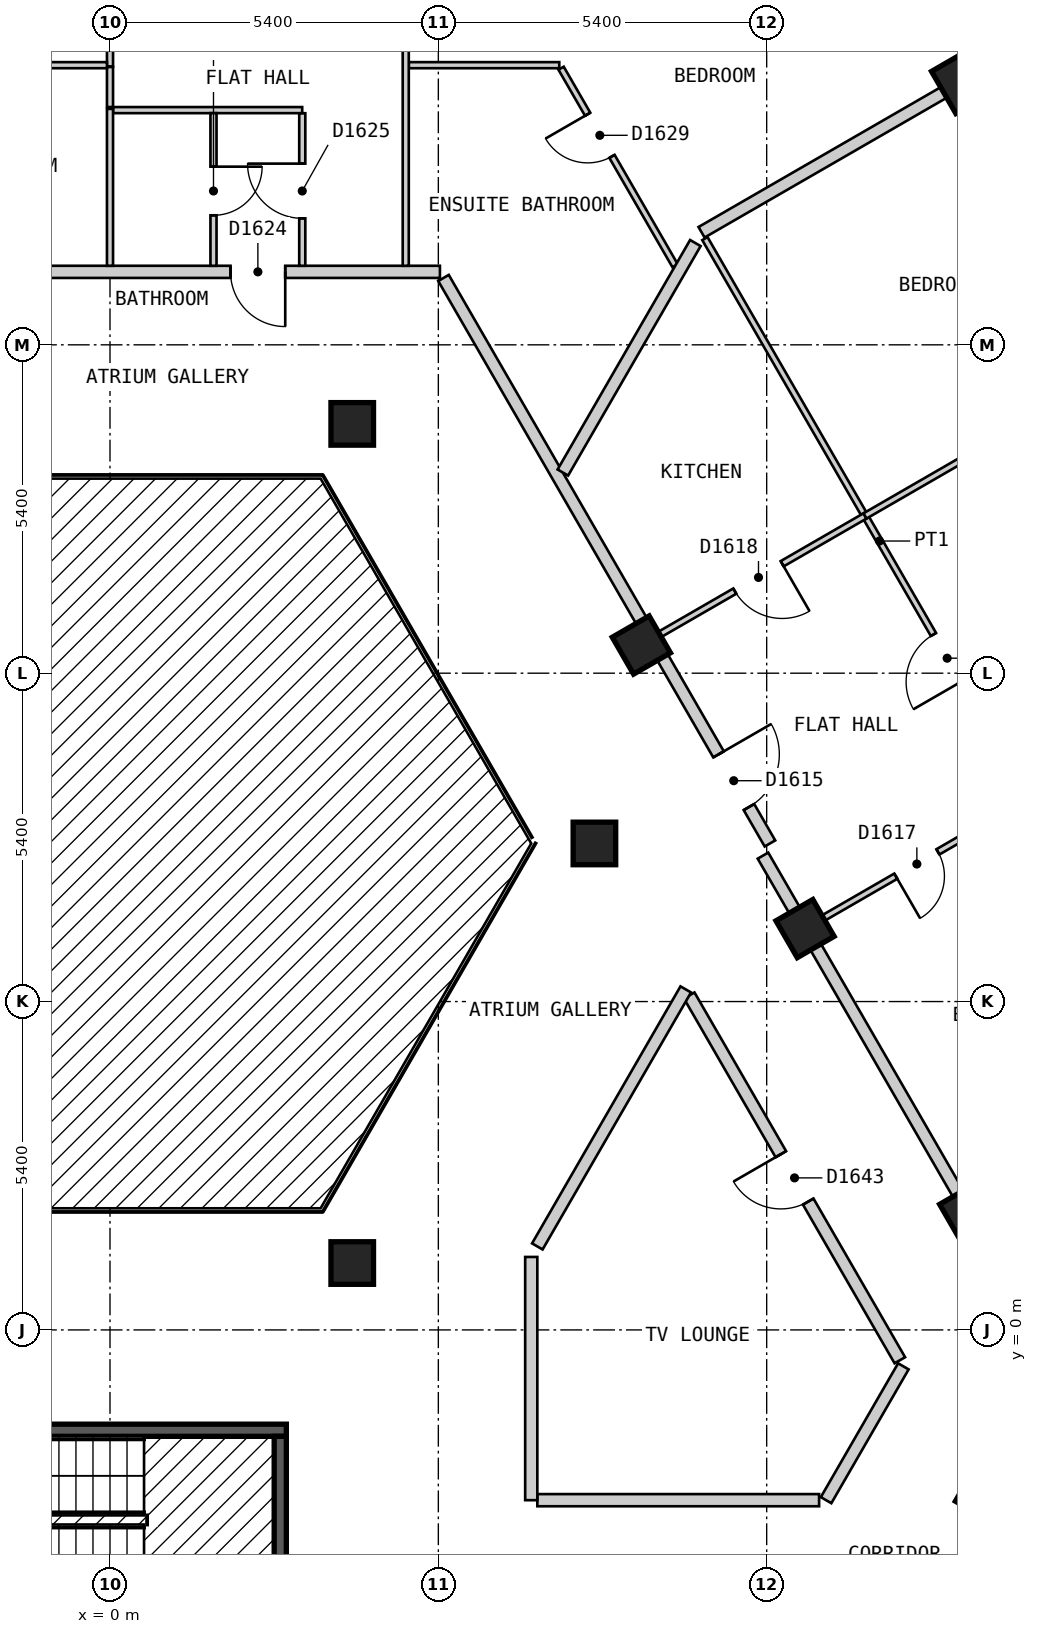
"""IFC4 building model, lengths in metres.
Left out: names, types, materials, properties, quantities, classifications, styles, units other than length and angle.
Written with IfcOpenShell. Run it as: python <this file> out.ifc"""

import sys

from ifc_helpers import new_model, si_unit, direction, frame, frame_2d, origin, origin_2d, place, context, subcontext, project, spatial, rectangle, extrude, element, fill, save


model = new_model("IFC4")
c1 = context("Model", 3, precision=1e-05, world=origin(), true_north=direction((0.0, 1.0)))
c2 = subcontext(c1, "Body", "Model", "MODEL_VIEW")
j1 = project(units=[si_unit("LENGTHUNIT", "METRE"), si_unit("PLANEANGLEUNIT", "RADIAN")], contexts=[c1])
p1 = place(None, origin())
s1 = spatial("IfcSite", under=j1, at=p1, CompositionType="ELEMENT")
p2 = place(p1, origin())
s2 = spatial("IfcBuilding", under=s1, at=p2, CompositionType="ELEMENT")
p3 = place(p2, frame((0.0, 0.0, 163.2)))
s3 = spatial("IfcBuildingStorey", under=s2, at=p3, CompositionType="ELEMENT", Elevation=163.2)
p4 = place(p3, frame((14.058, 20.55, 0.0), z_axis=(0.0, 0.0, 1.0), x_axis=(-0.5, 0.866025403784, 0.0)))
e1 = element("IfcColumn", 1, at=p4, inside=s3, PredefinedType="COLUMN", context=c2, shape_type="SweptSolid", body=[
    extrude(rectangle(XDim=0.8, YDim=0.8, at=origin_2d()), origin(), (0.0, 0.0, 1.0), 3.0),
])
for number, where, z_axis, x_axis in (
    (2, (14.382, -2.689, 0.0), (0.0, 0.0, 1.0), (0.5, 0.866, 0.0)),
    (3, (14.123, 1.937, 0.0), (0.0, 0.0, 1.0), (-0.5, 0.866, 0.0)),
    (4, (3.984, 1.1, 0.0), (0.0, 0.0, 1.0), (1.0, 0.0, 0.0)),
    (5, (11.431, 6.6, 0.0), (0.0, 0.0, 1.0), (-0.5, 0.866, 0.0)),
    (6, (7.967, 8.0, 0.0), (0.0, 0.0, 1.0), (1.0, 0.0, 0.0)),
    (7, (8.739, 11.263, 0.0), (0.0, 0.0, 1.0), (-0.5, 0.866, 0.0)),
    (8, (3.984, 14.9, 0.0), (0.0, 0.0, 1.0), (1.0, 0.0, 0.0)),
):
    element("IfcColumn", number, at=place(p3, frame(where, z_axis=z_axis, x_axis=x_axis)), inside=s3, PredefinedType="COLUMN", context=c2, shape_type="SweptSolid", body=[
        extrude(rectangle(XDim=0.7, YDim=0.7, at=origin_2d()), origin(), (0.0, 0.0, 1.0), 3.0),
    ])
p5 = place(p3, frame((-2.9, -1.65, 0.0), z_axis=(0.0, 0.0, 1.0), x_axis=(1.0, 0.0, 0.0)))
e9 = element("IfcWall", 9, at=p5, inside=s3, PredefinedType="SOLIDWALL", context=c2, shape_type="SweptSolid", body=[
    extrude(rectangle(XDim=5.8, YDim=0.2, at=frame_2d((2.9, 0.0))), origin(), (0.0, 0.0, 1.0), 2.7),
])
p6 = place(p5, frame((0.3, 0.0, 0.0)))
e10 = element("IfcOpeningElement", 10, at=p6, cuts=e9, PredefinedType="OPENING", context=c2, shape_type="SweptSolid", body=[
    extrude(rectangle(XDim=1.2, YDim=2.1, at=frame_2d((0.6, 1.05))), frame((0.0, 0.11, 0.0), z_axis=(0.0, -1.0, 0.0), x_axis=(1.0, 0.0, 0.0)), (0.0, 0.0, 1.0), 0.22),
])
p7 = place(p3, frame((2.8, -4.5, 0.0), z_axis=(0.0, 0.0, 1.0), x_axis=(0.0, 1.0, 0.0)))
e11 = element("IfcWall", 11, at=p7, inside=s3, PredefinedType="SOLIDWALL", context=c2, shape_type="SweptSolid", body=[
    extrude(rectangle(XDim=2.75, YDim=0.2, at=frame_2d((1.375, 0.0))), origin(), (0.0, 0.0, 1.0), 2.7),
])
p8 = place(p3, frame((9.526, 5.5, 0.0), z_axis=(0.0, 0.0, 1.0), x_axis=(0.500062092869, -0.865989551482, 0.0)))
e12 = element("IfcWall", 12, at=p8, inside=s3, PredefinedType="PARTITIONING", context=c2, shape_type="SweptSolid", body=[
    extrude(rectangle(XDim=6.927, YDim=0.2, at=frame_2d((3.464, 0.0))), origin(), (0.0, 0.0, 1.0), 2.7),
])
p9 = place(p8, frame((3.014, 0.0, 0.0)))
e13 = element("IfcOpeningElement", 13, at=p9, cuts=e12, PredefinedType="OPENING", context=c2, shape_type="SweptSolid", body=[
    extrude(rectangle(XDim=0.9, YDim=2.1, at=frame_2d((0.45, 1.05))), frame((0.0, 0.11, 0.0), z_axis=(0.0, -1.0, 0.0), x_axis=(1.0, 0.0, 0.0)), (0.0, 0.0, 1.0), 0.22),
])
p10 = place(p3, frame((10.739, 7.8, 0.0), z_axis=(0.0, 0.0, 1.0), x_axis=(0.499964311759, -0.86604600742, 0.0)))
e14 = element("IfcWall", 14, at=p10, inside=s3, PredefinedType="PARTITIONING", context=c2, shape_type="SweptSolid", body=[
    extrude(rectangle(XDim=9.583, YDim=0.2, at=frame_2d((4.792, 0.0))), origin(), (0.0, 0.0, 1.0), 2.7),
])
p11 = place(p3, frame((5.485, 17.3, 0.0), z_axis=(0.0, 0.0, 1.0), x_axis=(0.499965832213, -0.866045129667, 0.0)))
e15 = element("IfcWall", 15, at=p11, inside=s3, PredefinedType="PARTITIONING", context=c2, shape_type="SweptSolid", body=[
    extrude(rectangle(XDim=10.739, YDim=0.2, at=frame_2d((5.369, 0.0))), origin(), (0.0, 0.0, 1.0), 2.7),
])
p12 = place(p11, frame((9.047, 0.0, 0.0)))
e16 = element("IfcOpeningElement", 16, at=p12, cuts=e15, PredefinedType="OPENING", context=c2, shape_type="SweptSolid", body=[
    extrude(rectangle(XDim=1.0, YDim=2.1, at=frame_2d((0.5, 1.05))), frame((0.0, 0.11, 0.0), z_axis=(0.0, -1.0, 0.0), x_axis=(1.0, 0.0, 0.0)), (0.0, 0.0, 1.0), 0.22),
])
p13 = place(p3, frame((7.028, -2.8, 0.0), z_axis=(0.0, 0.0, 1.0), x_axis=(1.0, 0.0, 0.0)))
e17 = element("IfcWall", 17, at=p13, inside=s3, PredefinedType="PARTITIONING", context=c2, shape_type="SweptSolid", body=[
    extrude(rectangle(XDim=4.634, YDim=0.2, at=frame_2d((2.317, 0.0))), origin(), (0.0, 0.0, 1.0), 2.7),
])
p14 = place(p3, frame((-5.312, 17.4, 0.0), z_axis=(0.0, 0.0, 1.0), x_axis=(1.0, 0.0, 0.0)))
e18 = element("IfcWall", 18, at=p14, inside=s3, PredefinedType="PARTITIONING", context=c2, shape_type="SweptSolid", body=[
    extrude(rectangle(XDim=10.738, YDim=0.2, at=frame_2d((5.369, 0.0))), origin(), (0.0, 0.0, 1.0), 2.7),
])
p15 = place(p14, frame((7.294, 0.0, 0.0)))
e19 = element("IfcOpeningElement", 19, at=p15, cuts=e18, PredefinedType="OPENING", context=c2, shape_type="SweptSolid", body=[
    extrude(rectangle(XDim=0.9, YDim=2.1, at=frame_2d((0.45, 1.05))), frame((0.0, 0.11, 0.0), z_axis=(0.0, -1.0, 0.0), x_axis=(1.0, 0.0, 0.0)), (0.0, 0.0, 1.0), 0.22),
])
p16 = place(p3, frame((7.028, 1.373, 0.0), z_axis=(0.0, 0.0, 1.0), x_axis=(0.500065924398, 0.86598733897, 0.0)))
e20 = element("IfcWall", 20, at=p16, inside=s3, PredefinedType="PARTITIONING", context=c2, shape_type="SweptSolid", body=[
    extrude(rectangle(XDim=4.881, YDim=0.2, at=frame_2d((2.44, 0.0))), origin(), (0.0, 0.0, 1.0), 2.7),
])
p17 = place(p3, frame((11.777, -2.8, 0.0), z_axis=(0.0, 0.0, 1.0), x_axis=(0.500085537782, 0.86597601289, 0.0)))
e21 = element("IfcWall", 21, at=p17, inside=s3, PredefinedType="PARTITIONING", context=c2, shape_type="SweptSolid", body=[
    extrude(rectangle(XDim=2.542, YDim=0.2, at=frame_2d((1.271, 0.0))), origin(), (0.0, 0.0, 1.0), 2.7),
])
p18 = place(p3, frame((6.928, -2.8, 0.0), z_axis=(0.0, 0.0, 1.0), x_axis=(0.0, 1.0, 0.0)))
e22 = element("IfcWall", 22, at=p18, inside=s3, PredefinedType="PARTITIONING", context=c2, shape_type="SweptSolid", body=[
    extrude(rectangle(XDim=4.0, YDim=0.2, at=frame_2d((2.0, 0.0))), origin(), (0.0, 0.0, 1.0), 2.7),
])
p19 = place(p3, frame((7.419, 20.749, 0.0), z_axis=(0.0, 0.0, 1.0), x_axis=(0.499917691695, -0.866072919292, 0.0)))
e23 = element("IfcWall", 23, at=p19, inside=s3, PredefinedType="PARTITIONING", context=c2, shape_type="SweptSolid", body=[
    extrude(rectangle(XDim=3.753, YDim=0.1, at=frame_2d((1.876, 0.0))), origin(), (0.0, 0.0, 1.0), 2.7),
])
p20 = place(p19, frame((0.874, 0.0, 0.0)))
e24 = element("IfcOpeningElement", 24, at=p20, cuts=e23, PredefinedType="OPENING", context=c2, shape_type="SweptSolid", body=[
    extrude(rectangle(XDim=0.8, YDim=2.1, at=frame_2d((0.4, 1.05))), frame((0.0, 0.06, 0.0), z_axis=(0.0, -1.0, 0.0), x_axis=(1.0, 0.0, 0.0)), (0.0, 0.0, 1.0), 0.12),
])
p21 = place(p3, frame((9.784, 17.947, 0.0), z_axis=(0.0, 0.0, 1.0), x_axis=(0.500016228266, -0.866016034188, 0.0)))
e25 = element("IfcWall", 25, at=p21, inside=s3, PredefinedType="PARTITIONING", context=c2, shape_type="SweptSolid", body=[
    extrude(rectangle(XDim=11.486, YDim=0.1, at=frame_2d((5.743, 0.0))), origin(), (0.0, 0.0, 1.0), 2.7),
])
p22 = place(p21, frame((7.518, 0.0, 0.0)))
e26 = element("IfcOpeningElement", 26, at=p22, cuts=e25, PredefinedType="OPENING", context=c2, shape_type="SweptSolid", body=[
    extrude(rectangle(XDim=0.9, YDim=2.1, at=frame_2d((0.45, 1.05))), frame((0.0, 0.06, 0.0), z_axis=(0.0, -1.0, 0.0), x_axis=(1.0, 0.0, 0.0)), (0.0, 0.0, 1.0), 0.12),
])
p23 = place(p3, frame((0.0, 20.769, 0.0), z_axis=(0.0, 0.0, 1.0), x_axis=(0.0, -1.0, 0.0)))
e27 = element("IfcWall", 27, at=p23, inside=s3, PredefinedType="PARTITIONING", context=c2, shape_type="SweptSolid", body=[
    extrude(rectangle(XDim=0.659, YDim=0.1, at=frame_2d((0.33, 0.0))), origin(), (0.0, 0.0, 1.0), 2.7),
])
p24 = place(p3, frame((3.162, 20.009, 0.0), z_axis=(0.0, 0.0, 1.0), x_axis=(0.0, -1.0, 0.0)))
e28 = element("IfcWall", 28, at=p24, inside=s3, PredefinedType="PARTITIONING", context=c2, shape_type="SweptSolid", body=[
    extrude(rectangle(XDim=2.509, YDim=0.1, at=frame_2d((1.254, 0.0))), origin(), (0.0, 0.0, 1.0), 2.7),
])
p25 = place(p24, frame((0.829, 0.0, 0.0)))
e29 = element("IfcOpeningElement", 29, at=p25, cuts=e28, PredefinedType="OPENING", context=c2, shape_type="SweptSolid", body=[
    extrude(rectangle(XDim=0.9, YDim=2.1, at=frame_2d((0.45, 1.05))), frame((0.0, 0.06, 0.0), z_axis=(0.0, -1.0, 0.0), x_axis=(1.0, 0.0, 0.0)), (0.0, 0.0, 1.0), 0.12),
])
p26 = place(p3, frame((0.05, 20.06, 0.0), z_axis=(0.0, 0.0, 1.0), x_axis=(1.0, 0.0, 0.0)))
e30 = element("IfcWall", 30, at=p26, inside=s3, PredefinedType="PARTITIONING", context=c2, shape_type="SweptSolid", body=[
    extrude(rectangle(XDim=3.111, YDim=0.1, at=frame_2d((1.555, 0.0))), origin(), (0.0, 0.0, 1.0), 2.7),
])
p27 = place(p3, frame((4.914, 20.799, 0.0), z_axis=(0.0, 0.0, 1.0), x_axis=(1.0, 0.0, 0.0)))
e31 = element("IfcWall", 31, at=p27, inside=s3, PredefinedType="PARTITIONING", context=c2, shape_type="SweptSolid", body=[
    extrude(rectangle(XDim=2.475, YDim=0.1, at=frame_2d((1.237, 0.0))), origin(), (0.0, 0.0, 1.0), 2.7),
])
p28 = place(p3, frame((4.864, 17.5, 0.0), z_axis=(0.0, 0.0, 1.0), x_axis=(0.0, 1.0, 0.0)))
e32 = element("IfcWall", 32, at=p28, inside=s3, PredefinedType="PARTITIONING", context=c2, shape_type="SweptSolid", body=[
    extrude(rectangle(XDim=6.4, YDim=0.1, at=frame_2d((3.2, 0.0))), origin(), (0.0, 0.0, 1.0), 2.7),
])
p29 = place(p28, frame((4.2, 0.0, 0.0)))
e33 = element("IfcOpeningElement", 33, at=p29, cuts=e32, PredefinedType="OPENING", context=c2, shape_type="SweptSolid", body=[
    extrude(rectangle(XDim=0.9, YDim=2.1, at=frame_2d((0.45, 1.05))), frame((0.0, 0.06, 0.0), z_axis=(0.0, -1.0, 0.0), x_axis=(1.0, 0.0, 0.0)), (0.0, 0.0, 1.0), 0.12),
])
p30 = place(p3, frame((1.702, 17.5, 0.0), z_axis=(0.0, 0.0, 1.0), x_axis=(0.0, 1.0, 0.0)))
e34 = element("IfcWall", 34, at=p30, inside=s3, PredefinedType="PARTITIONING", context=c2, shape_type="SweptSolid", body=[
    extrude(rectangle(XDim=2.51, YDim=0.1, at=frame_2d((1.255, 0.0))), origin(), (0.0, 0.0, 1.0), 2.7),
])
p31 = place(p30, frame((0.83, 0.0, 0.0)))
e35 = element("IfcOpeningElement", 35, at=p31, cuts=e34, PredefinedType="OPENING", context=c2, shape_type="SweptSolid", body=[
    extrude(rectangle(XDim=0.8, YDim=2.1, at=frame_2d((0.4, 1.05))), frame((0.0, 0.06, 0.0), z_axis=(0.0, -1.0, 0.0), x_axis=(1.0, 0.0, 0.0)), (0.0, 0.0, 1.0), 0.12),
])
p32 = place(p3, frame((0.0, 17.5, 0.0), z_axis=(0.0, 0.0, 1.0), x_axis=(0.0, 1.0, 0.0)))
e36 = element("IfcWall", 36, at=p32, inside=s3, PredefinedType="PARTITIONING", context=c2, shape_type="SweptSolid", body=[
    extrude(rectangle(XDim=2.58, YDim=0.1, at=frame_2d((1.29, 0.0))), origin(), (0.0, 0.0, 1.0), 2.7),
])
p33 = place(p3, frame((0.0, 20.779, 0.0), z_axis=(0.0, 0.0, 1.0), x_axis=(0.0, 1.0, 0.0)))
e37 = element("IfcWall", 37, at=p33, inside=s3, PredefinedType="PARTITIONING", context=c2, shape_type="SweptSolid", body=[
    extrude(rectangle(XDim=3.121, YDim=0.1, at=frame_2d((1.561, 0.0))), origin(), (0.0, 0.0, 1.0), 2.7),
])
p34 = place(p33, frame((0.91, 0.0, 0.0)))
e38 = element("IfcOpeningElement", 38, at=p34, cuts=e37, PredefinedType="OPENING", context=c2, shape_type="SweptSolid", body=[
    extrude(rectangle(XDim=0.9, YDim=2.1, at=frame_2d((0.45, 1.05))), frame((0.0, 0.06, 0.0), z_axis=(0.0, -1.0, 0.0), x_axis=(1.0, 0.0, 0.0)), (0.0, 0.0, 1.0), 0.12),
])
p35 = place(p3, frame((11.518, 6.65, 0.0), z_axis=(0.0, 0.0, 1.0), x_axis=(0.865949381454, 0.500131651427, 0.0)))
e39 = element("IfcWall", 39, at=p35, inside=s3, PredefinedType="PARTITIONING", context=c2, shape_type="SweptSolid", body=[
    extrude(rectangle(XDim=4.097, YDim=0.1, at=frame_2d((2.049, 0.0))), origin(), (0.0, 0.0, 1.0), 2.7),
])
p36 = place(p35, frame((1.623, 0.0, 0.0)))
e40 = element("IfcOpeningElement", 40, at=p36, cuts=e39, PredefinedType="OPENING", context=c2, shape_type="SweptSolid", body=[
    extrude(rectangle(XDim=0.8, YDim=2.1, at=frame_2d((0.4, 1.05))), frame((0.0, 0.06, 0.0), z_axis=(0.0, -1.0, 0.0), x_axis=(1.0, 0.0, 0.0)), (0.0, 0.0, 1.0), 0.12),
])
p37 = place(p3, frame((8.999, 11.413, 0.0), z_axis=(0.0, 0.0, 1.0), x_axis=(0.866076396086, 0.499911668341, 0.0)))
e41 = element("IfcWall", 41, at=p37, inside=s3, PredefinedType="PARTITIONING", context=c2, shape_type="SweptSolid", body=[
    extrude(rectangle(XDim=3.947, YDim=0.1, at=frame_2d((1.973, 0.0))), origin(), (0.0, 0.0, 1.0), 2.7),
])
p38 = place(p37, frame((1.474, 0.0, 0.0)))
e42 = element("IfcOpeningElement", 42, at=p38, cuts=e41, PredefinedType="OPENING", context=c2, shape_type="SweptSolid", body=[
    extrude(rectangle(XDim=0.9, YDim=2.1, at=frame_2d((0.45, 1.05))), frame((0.0, 0.06, 0.0), z_axis=(0.0, -1.0, 0.0), x_axis=(1.0, 0.0, 0.0)), (0.0, 0.0, 1.0), 0.12),
])
p39 = place(p3, frame((7.448, 14.1, 0.0), z_axis=(0.0, 0.0, 1.0), x_axis=(0.500013426303, 0.866017651966, 0.0)))
e43 = element("IfcWall", 43, at=p39, inside=s3, PredefinedType="PARTITIONING", context=c2, shape_type="SweptSolid", body=[
    extrude(rectangle(XDim=4.358, YDim=0.2, at=frame_2d((2.179, 0.0))), origin(), (0.0, 0.0, 1.0), 2.7),
])
p40 = place(p3, frame((9.729, 18.051, 0.0), z_axis=(0.0, 0.0, 1.0), x_axis=(0.866038213712, 0.499977811898, 0.0)))
e44 = element("IfcWall", 44, at=p40, inside=s3, PredefinedType="PARTITIONING", context=c2, shape_type="SweptSolid", body=[
    extrude(rectangle(XDim=5.848, YDim=0.2, at=frame_2d((2.924, 0.0))), origin(), (0.0, 0.0, 1.0), 2.7),
])
p41 = place(p3, frame((12.417, 13.386, 0.0), z_axis=(0.0, 0.0, 1.0), x_axis=(0.86599873886, 0.50004618216, 0.0)))
e45 = element("IfcWall", 45, at=p41, inside=s3, PredefinedType="PARTITIONING", context=c2, shape_type="SweptSolid", body=[
    extrude(rectangle(XDim=5.854, YDim=0.1, at=frame_2d((2.927, 0.0))), origin(), (0.0, 0.0, 1.0), 2.7),
])
p42 = place(p41, frame((2.476, 0.0, 0.0)))
e46 = element("IfcOpeningElement", 46, at=p42, cuts=e45, PredefinedType="OPENING", context=c2, shape_type="SweptSolid", body=[
    extrude(rectangle(XDim=0.9, YDim=2.1, at=frame_2d((0.45, 1.05))), frame((0.0, 0.06, 0.0), z_axis=(0.0, -1.0, 0.0), x_axis=(1.0, 0.0, 0.0)), (0.0, 0.0, 1.0), 0.12),
])
p43 = place(p3, frame((-4.864, 20.799, 0.0), z_axis=(0.0, 0.0, 1.0), x_axis=(1.0, 0.0, 0.0)))
e47 = element("IfcWall", 47, at=p43, inside=s3, PredefinedType="PARTITIONING", context=c2, shape_type="SweptSolid", body=[
    extrude(rectangle(XDim=4.814, YDim=0.1, at=frame_2d((2.407, 0.0))), origin(), (0.0, 0.0, 1.0), 2.7),
])
p44 = place(p43, frame((2.032, 0.0, 0.0)))
e48 = element("IfcOpeningElement", 48, at=p44, cuts=e47, PredefinedType="OPENING", context=c2, shape_type="SweptSolid", body=[
    extrude(rectangle(XDim=0.8, YDim=2.1, at=frame_2d((0.4, 1.05))), frame((0.0, 0.06, 0.0), z_axis=(0.0, -1.0, 0.0), x_axis=(1.0, 0.0, 0.0)), (0.0, 0.0, 1.0), 0.12),
])
p45 = place(p12, origin())
e49 = element("IfcDoor", 49, at=p45, inside=s3, OperationType="SINGLE_SWING_LEFT", PredefinedType="DOOR", context=c2, shape_type="SweptSolid", body=[
    extrude(rectangle(XDim=1.0, YDim=2.1, at=frame_2d((0.5, 1.05))), frame((0.0, 0.025, 0.0), z_axis=(0.0, -1.0, 0.0), x_axis=(1.0, 0.0, 0.0)), (0.0, 0.0, 1.0), 0.05),
])
fill(e16, e49)
p46 = place(p22, origin())
e50 = element("IfcDoor", 50, at=p46, inside=s3, OperationType="SINGLE_SWING_RIGHT", PredefinedType="DOOR", context=c2, shape_type="SweptSolid", body=[
    extrude(rectangle(XDim=0.9, YDim=2.1, at=frame_2d((0.45, 1.05))), frame((0.0, 0.025, 0.0), z_axis=(0.0, -1.0, 0.0), x_axis=(1.0, 0.0, 0.0)), (0.0, 0.0, 1.0), 0.05),
])
fill(e26, e50)
p47 = place(p36, origin())
e51 = element("IfcDoor", 51, at=p47, inside=s3, OperationType="SINGLE_SWING_LEFT", PredefinedType="DOOR", context=c2, shape_type="SweptSolid", body=[
    extrude(rectangle(XDim=0.8, YDim=2.1, at=frame_2d((0.4, 1.05))), frame((0.0, 0.025, 0.0), z_axis=(0.0, -1.0, 0.0), x_axis=(1.0, 0.0, 0.0)), (0.0, 0.0, 1.0), 0.05),
])
fill(e40, e51)
p48 = place(p38, origin())
e52 = element("IfcDoor", 52, at=p48, inside=s3, OperationType="SINGLE_SWING_RIGHT", PredefinedType="DOOR", context=c2, shape_type="SweptSolid", body=[
    extrude(rectangle(XDim=0.9, YDim=2.1, at=frame_2d((0.45, 1.05))), frame((0.0, 0.025, 0.0), z_axis=(0.0, -1.0, 0.0), x_axis=(1.0, 0.0, 0.0)), (0.0, 0.0, 1.0), 0.05),
])
fill(e42, e52)
p49 = place(p15, origin())
e53 = element("IfcDoor", 53, at=p49, inside=s3, OperationType="SINGLE_SWING_RIGHT", PredefinedType="DOOR", context=c2, shape_type="SweptSolid", body=[
    extrude(rectangle(XDim=0.9, YDim=2.1, at=frame_2d((0.45, 1.05))), frame((0.0, 0.025, 0.0), z_axis=(0.0, -1.0, 0.0), x_axis=(1.0, 0.0, 0.0)), (0.0, 0.0, 1.0), 0.05),
])
fill(e19, e53)
p50 = place(p25, origin())
e54 = element("IfcDoor", 54, at=p50, inside=s3, OperationType="SINGLE_SWING_LEFT", PredefinedType="DOOR", context=c2, shape_type="SweptSolid", body=[
    extrude(rectangle(XDim=0.9, YDim=2.1, at=frame_2d((0.45, 1.05))), frame((0.0, 0.025, 0.0), z_axis=(0.0, -1.0, 0.0), x_axis=(1.0, 0.0, 0.0)), (0.0, 0.0, 1.0), 0.05),
])
fill(e29, e54)
p51 = place(p31, origin())
e55 = element("IfcDoor", 55, at=p51, inside=s3, OperationType="SINGLE_SWING_RIGHT", PredefinedType="DOOR", context=c2, shape_type="SweptSolid", body=[
    extrude(rectangle(XDim=0.8, YDim=2.1, at=frame_2d((0.4, 1.05))), frame((0.0, 0.025, 0.0), z_axis=(0.0, -1.0, 0.0), x_axis=(1.0, 0.0, 0.0)), (0.0, 0.0, 1.0), 0.05),
])
fill(e35, e55)
p52 = place(p20, origin())
e56 = element("IfcDoor", 56, at=p52, inside=s3, OperationType="SINGLE_SWING_LEFT", PredefinedType="DOOR", context=c2, shape_type="SweptSolid", body=[
    extrude(rectangle(XDim=0.8, YDim=2.1, at=frame_2d((0.4, 1.05))), frame((0.0, 0.025, 0.0), z_axis=(0.0, -1.0, 0.0), x_axis=(1.0, 0.0, 0.0)), (0.0, 0.0, 1.0), 0.05),
])
fill(e24, e56)
p53 = place(p9, origin())
e57 = element("IfcDoor", 57, at=p53, inside=s3, OperationType="SINGLE_SWING_LEFT", PredefinedType="DOOR", context=c2, shape_type="SweptSolid", body=[
    extrude(rectangle(XDim=0.9, YDim=2.1, at=frame_2d((0.45, 1.05))), frame((0.0, 0.025, 0.0), z_axis=(0.0, -1.0, 0.0), x_axis=(1.0, 0.0, 0.0)), (0.0, 0.0, 1.0), 0.05),
])
fill(e13, e57)
save(model, sys.argv[1])
